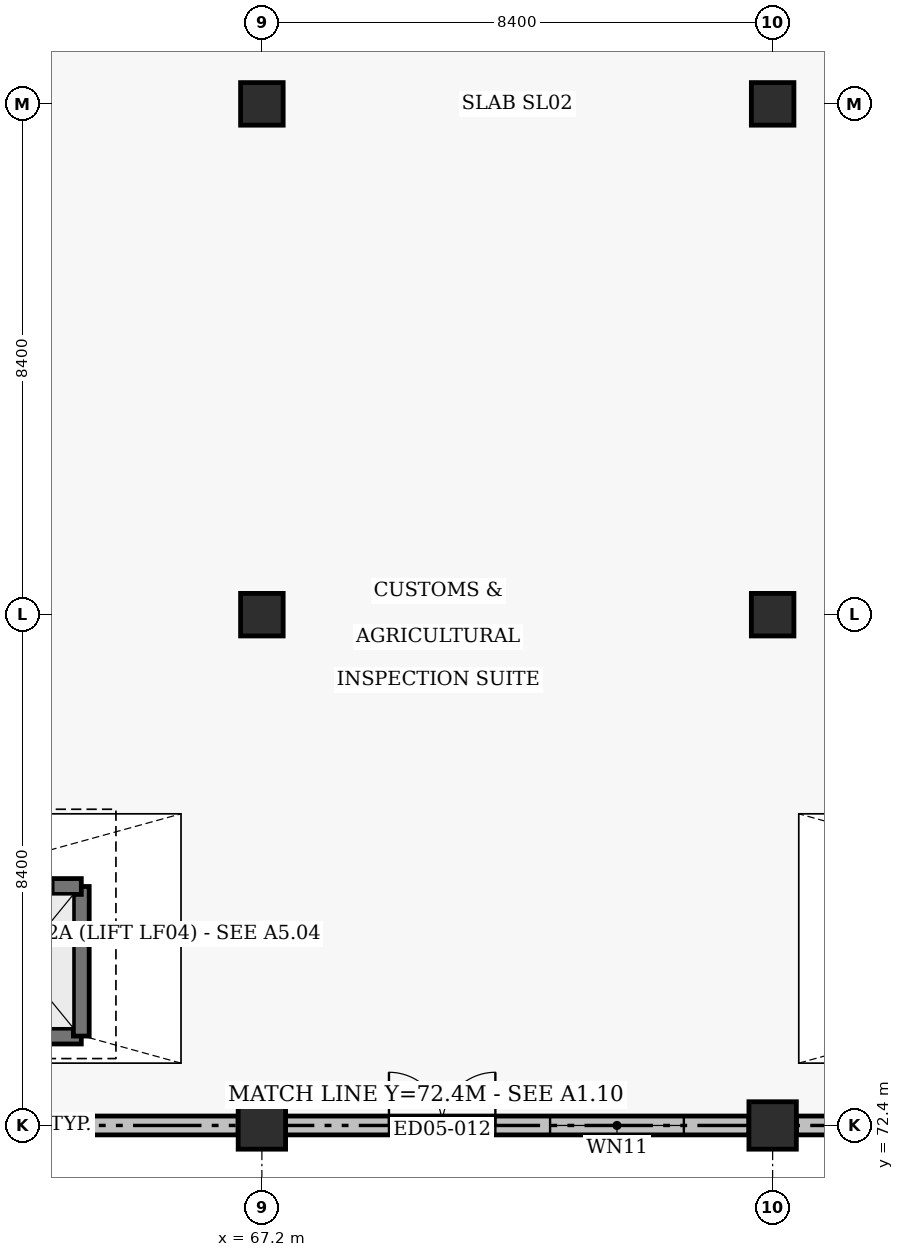
"""IFC4 building model, lengths in metres.
Left out: names, types, materials, properties, quantities, classifications, styles, units other than length and angle.
Written with IfcOpenShell. Run it as: python <this file> out.ifc"""

import sys

from ifc_helpers import new_model, si_unit, direction, frame, frame_2d, origin, origin_2d, place, context, subcontext, project, spatial, rectangle, circle, extrude, element, fill, save


model = new_model("IFC4")
c1 = context("Model", 3, precision=1e-05, world=origin(), true_north=direction((0.0, 1.0)))
c2 = subcontext(c1, "Body", "Model", "MODEL_VIEW")
j1 = project(units=[si_unit("LENGTHUNIT", "METRE"), si_unit("PLANEANGLEUNIT", "RADIAN")], contexts=[c1])
p1 = place(None, origin())
s1 = spatial("IfcSite", under=j1, at=p1, CompositionType="ELEMENT")
p2 = place(p1, origin())
s2 = spatial("IfcBuilding", under=s1, at=p2, CompositionType="ELEMENT")
p3 = place(p2, origin())
s3 = spatial("IfcBuildingStorey", under=s2, at=p3, CompositionType="ELEMENT", Elevation=0.0)
p4 = place(p3, frame((67.2, 72.4, -0.46), z_axis=(0.0, 0.0, 1.0), x_axis=(1.0, 0.0, 0.0)))
e1 = element("IfcColumn", 1, at=p4, inside=s3, PredefinedType="COLUMN", context=c2, shape_type="SweptSolid", body=[
    extrude(circle(Radius=0.39, at=origin_2d()), origin(), (0.0, 0.0, 1.0), 5.9),
])
for number, where, z_axis, x_axis in (
    (2, (67.2, 80.8, -0.46), (0.0, 0.0, 1.0), (1.0, 0.0, 0.0)),
    (3, (67.2, 89.2, -0.46), (0.0, 0.0, 1.0), (1.0, 0.0, 0.0)),
):
    element("IfcColumn", number, at=place(p3, frame(where, z_axis=z_axis, x_axis=x_axis)), inside=s3, PredefinedType="COLUMN", context=c2, shape_type="SweptSolid", body=[
        extrude(rectangle(XDim=0.7, YDim=0.7, at=origin_2d()), origin(), (0.0, 0.0, 1.0), 5.9),
    ])
p5 = place(p3, frame((75.6, 72.4, -0.46), z_axis=(0.0, 0.0, 1.0), x_axis=(1.0, 0.0, 0.0)))
e4 = element("IfcColumn", 4, at=p5, inside=s3, PredefinedType="COLUMN", context=c2, shape_type="SweptSolid", body=[
    extrude(circle(Radius=0.39, at=origin_2d()), origin(), (0.0, 0.0, 1.0), 5.9),
])
for number, where, z_axis, x_axis in (
    (5, (75.6, 80.8, -0.46), (0.0, 0.0, 1.0), (1.0, 0.0, 0.0)),
    (6, (75.6, 89.2, -0.46), (0.0, 0.0, 1.0), (1.0, 0.0, 0.0)),
):
    element("IfcColumn", number, at=place(p3, frame(where, z_axis=z_axis, x_axis=x_axis)), inside=s3, PredefinedType="COLUMN", context=c2, shape_type="SweptSolid", body=[
        extrude(rectangle(XDim=0.7, YDim=0.7, at=origin_2d()), origin(), (0.0, 0.0, 1.0), 5.9),
    ])
p6 = place(p3, frame((59.19, 72.4, 0.0), z_axis=(0.0, 0.0, 1.0), x_axis=(1.0, 0.0, 0.0)))
e7 = element("IfcWall", 7, at=p6, inside=s3, PredefinedType="SOLIDWALL", context=c2, shape_type="SweptSolid", body=[
    extrude(rectangle(XDim=7.62, YDim=0.31, at=frame_2d((3.81, 0.0))), origin(), (0.0, 0.0, 1.0), 4.605),
])
p7 = place(p6, frame((2.8, 0.0, 1.0)))
e8 = element("IfcOpeningElement", 8, at=p7, cuts=e7, PredefinedType="OPENING", context=c2, shape_type="SweptSolid", body=[
    extrude(rectangle(XDim=1.9, YDim=1.55, at=frame_2d((0.95, 0.775))), frame((0.0, 0.165, 0.0), z_axis=(0.0, -1.0, 0.0), x_axis=(1.0, 0.0, 0.0)), (0.0, 0.0, 1.0), 0.33),
])
p8 = place(p3, frame((67.59, 72.4, 0.0), z_axis=(0.0, 0.0, 1.0), x_axis=(1.0, 0.0, 0.0)))
e9 = element("IfcWall", 9, at=p8, inside=s3, PredefinedType="SOLIDWALL", context=c2, shape_type="SweptSolid", body=[
    extrude(rectangle(XDim=7.62, YDim=0.31, at=frame_2d((3.81, 0.0))), origin(), (0.0, 0.0, 1.0), 4.605),
])
p9 = place(p8, frame((1.7, 0.0, 0.0)))
e10 = element("IfcOpeningElement", 10, at=p9, cuts=e9, PredefinedType="OPENING", context=c2, shape_type="SweptSolid", body=[
    extrude(rectangle(XDim=1.75, YDim=2.15, at=frame_2d((0.875, 1.075))), frame((0.0, 0.165, 0.0), z_axis=(0.0, -1.0, 0.0), x_axis=(1.0, 0.0, 0.0)), (0.0, 0.0, 1.0), 0.33),
])
p10 = place(p8, frame((4.35, 0.0, 1.0)))
e11 = element("IfcOpeningElement", 11, at=p10, cuts=e9, PredefinedType="OPENING", context=c2, shape_type="SweptSolid", body=[
    extrude(rectangle(XDim=2.2, YDim=1.55, at=frame_2d((1.1, 0.775))), frame((0.0, 0.165, 0.0), z_axis=(0.0, -1.0, 0.0), x_axis=(1.0, 0.0, 0.0)), (0.0, 0.0, 1.0), 0.33),
])
p11 = place(p3, frame((75.99, 72.4, 0.0), z_axis=(0.0, 0.0, 1.0), x_axis=(1.0, 0.0, 0.0)))
e12 = element("IfcWall", 12, at=p11, inside=s3, PredefinedType="SOLIDWALL", context=c2, shape_type="SweptSolid", body=[
    extrude(rectangle(XDim=7.62, YDim=0.31, at=frame_2d((3.81, 0.0))), origin(), (0.0, 0.0, 1.0), 4.605),
])
p12 = place(p11, frame((2.8, 0.0, 1.0)))
e13 = element("IfcOpeningElement", 13, at=p12, cuts=e12, PredefinedType="OPENING", context=c2, shape_type="SweptSolid", body=[
    extrude(rectangle(XDim=1.9, YDim=1.55, at=frame_2d((0.95, 0.775))), frame((0.0, 0.165, 0.0), z_axis=(0.0, -1.0, 0.0), x_axis=(1.0, 0.0, 0.0)), (0.0, 0.0, 1.0), 0.33),
])
p13 = place(p3, frame((62.17, 73.87, 0.0), z_axis=(0.0, 0.0, 1.0), x_axis=(1.0, 0.0, 0.0)))
e14 = element("IfcWall", 14, at=p13, inside=s3, PredefinedType="SHEAR", context=c2, shape_type="SweptSolid", body=[
    extrude(rectangle(XDim=2.06, YDim=0.26, at=frame_2d((1.03, 0.0))), origin(), (0.0, 0.0, 1.0), 5.44),
])
p14 = place(p3, frame((64.23, 73.87, 0.0), z_axis=(0.0, 0.0, 1.0), x_axis=(0.0, 1.0, 0.0)))
e15 = element("IfcWall", 15, at=p14, inside=s3, PredefinedType="SHEAR", context=c2, shape_type="SweptSolid", body=[
    extrude(rectangle(XDim=2.46, YDim=0.26, at=frame_2d((1.23, 0.0))), origin(), (0.0, 0.0, 1.0), 5.44),
])
p15 = place(p3, frame((62.17, 76.33, 0.0), z_axis=(0.0, 0.0, 1.0), x_axis=(1.0, 0.0, 0.0)))
e16 = element("IfcWall", 16, at=p15, inside=s3, PredefinedType="SHEAR", context=c2, shape_type="SweptSolid", body=[
    extrude(rectangle(XDim=2.06, YDim=0.26, at=frame_2d((1.03, 0.0))), origin(), (0.0, 0.0, 1.0), 5.44),
])
p16 = place(p15, frame((0.46, 0.0, 0.0)))
e17 = element("IfcOpeningElement", 17, at=p16, cuts=e16, PredefinedType="OPENING", context=c2, shape_type="SweptSolid", body=[
    extrude(rectangle(XDim=1.14, YDim=2.14, at=frame_2d((0.57, 1.07))), frame((0.0, 0.14, 0.0), z_axis=(0.0, -1.0, 0.0), x_axis=(1.0, 0.0, 0.0)), (0.0, 0.0, 1.0), 0.28),
])
p17 = place(p7, origin())
e18 = element("IfcWindow", 18, at=p17, inside=s3, PartitioningType="DOUBLE_PANEL_VERTICAL", PredefinedType="WINDOW", context=c2, shape_type="SweptSolid", body=[
    extrude(rectangle(XDim=1.9, YDim=1.55, at=frame_2d((0.95, 0.775))), frame((0.0, 0.03, 0.0), z_axis=(0.0, -1.0, 0.0), x_axis=(1.0, 0.0, 0.0)), (0.0, 0.0, 1.0), 0.06),
])
fill(e8, e18)
p18 = place(p9, origin())
e19 = element("IfcDoor", 19, at=p18, inside=s3, OperationType="DOUBLE_DOOR_SINGLE_SWING", PredefinedType="DOOR", context=c2, shape_type="SweptSolid", body=[
    extrude(rectangle(XDim=1.75, YDim=2.15, at=frame_2d((0.875, 1.075))), frame((0.0, 0.025, 0.0), z_axis=(0.0, -1.0, 0.0), x_axis=(1.0, 0.0, 0.0)), (0.0, 0.0, 1.0), 0.05),
])
fill(e10, e19)
p19 = place(p10, origin())
e20 = element("IfcWindow", 20, at=p19, inside=s3, PartitioningType="DOUBLE_PANEL_VERTICAL", PredefinedType="WINDOW", context=c2, shape_type="SweptSolid", body=[
    extrude(rectangle(XDim=2.2, YDim=1.55, at=frame_2d((1.1, 0.775))), frame((0.0, 0.03, 0.0), z_axis=(0.0, -1.0, 0.0), x_axis=(1.0, 0.0, 0.0)), (0.0, 0.0, 1.0), 0.06),
])
fill(e11, e20)
p20 = place(p16, origin())
e21 = element("IfcDoor", 21, at=p20, inside=s3, OperationType="DOUBLE_DOOR_SLIDING", PredefinedType="DOOR", context=c2, shape_type="SweptSolid", body=[
    extrude(rectangle(XDim=1.14, YDim=2.14, at=frame_2d((0.57, 1.07))), frame((0.0, 0.025, 0.0), z_axis=(0.0, -1.0, 0.0), x_axis=(1.0, 0.0, 0.0)), (0.0, 0.0, 1.0), 0.05),
])
fill(e17, e21)
save(model, sys.argv[1])
